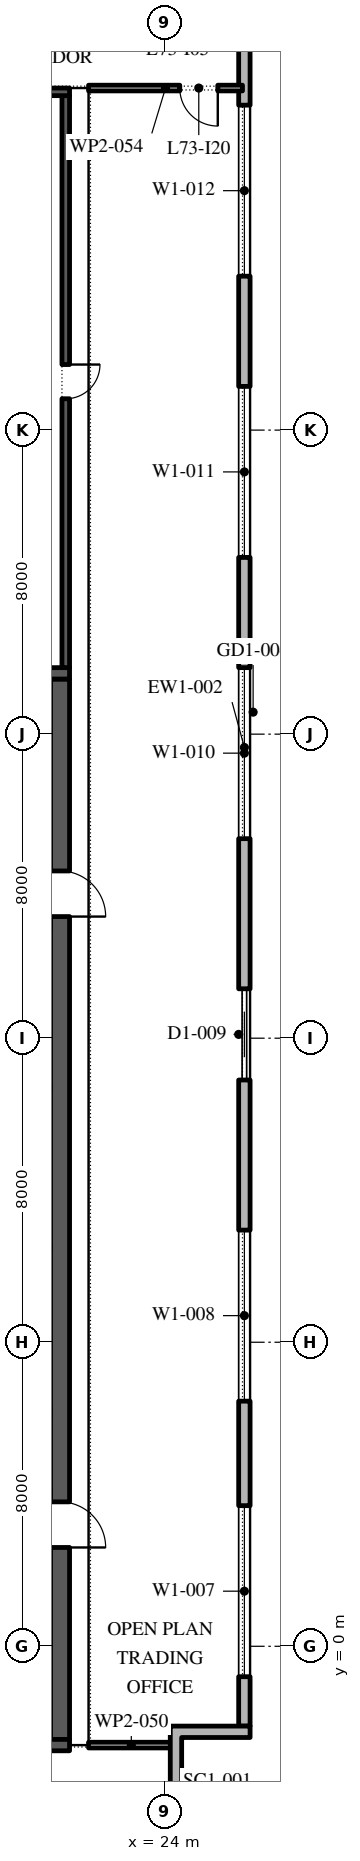
"""IFC4 building model, lengths in metres.
Left out: names, types, materials, properties, quantities, classifications, styles, units other than length and angle.
Written with IfcOpenShell. Run it as: python <this file> out.ifc"""

import sys

from ifc_helpers import new_model, si_unit, direction, frame, frame_2d, origin, place, context, subcontext, project, spatial, polyline, rectangle, outline, extrude, element, fill, save


model = new_model("IFC4")
c1 = context("Model", 3, precision=1e-05, world=origin(), true_north=direction((0.0, 1.0)))
c2 = subcontext(c1, "Body", "Model", "MODEL_VIEW")
j1 = project(units=[si_unit("LENGTHUNIT", "METRE"), si_unit("PLANEANGLEUNIT", "RADIAN")], contexts=[c1])
p1 = place(None, origin())
s1 = spatial("IfcSite", under=j1, at=p1, CompositionType="ELEMENT")
p2 = place(p1, origin())
s2 = spatial("IfcBuilding", under=s1, at=p2, CompositionType="ELEMENT")
p3 = place(p2, frame((0.0, 0.0, 334.2)))
s3 = spatial("IfcBuildingStorey", under=s2, at=p3, CompositionType="ELEMENT", Elevation=334.2)
p4 = place(p3, frame((26.1, -2.1, 0.0), z_axis=(0.0, 0.0, 1.0), x_axis=(0.0, 1.0, 0.0)))
e1 = element("IfcWall", 1, at=p4, inside=s3, PredefinedType="STANDARD", context=c2, shape_type="SweptSolid", body=[
    extrude(rectangle(XDim=51.5, YDim=0.3, at=frame_2d((25.75, 0.0))), origin(), (0.0, 0.0, 1.0), 4.0),
])
p5 = place(p4, frame((1.3, 0.0, 0.45)))
e2 = element("IfcOpeningElement", 2, at=p5, cuts=e1, PredefinedType="OPENING", context=c2, shape_type="SweptSolid", body=[
    extrude(rectangle(XDim=4.5, YDim=3.05, at=frame_2d((2.25, 1.525))), frame((0.0, 0.16, 0.0), z_axis=(0.0, -1.0, 0.0), x_axis=(1.0, 0.0, 0.0)), (0.0, 0.0, 1.0), 0.32),
])
p6 = place(p4, frame((8.55, 0.0, 0.45)))
e3 = element("IfcOpeningElement", 3, at=p6, cuts=e1, PredefinedType="OPENING", context=c2, shape_type="SweptSolid", body=[
    extrude(rectangle(XDim=4.5, YDim=3.05, at=frame_2d((2.25, 1.525))), frame((0.0, 0.16, 0.0), z_axis=(0.0, -1.0, 0.0), x_axis=(1.0, 0.0, 0.0)), (0.0, 0.0, 1.0), 0.32),
])
p7 = place(p4, frame((17.0, 0.0, 0.0)))
e4 = element("IfcOpeningElement", 4, at=p7, cuts=e1, PredefinedType="OPENING", context=c2, shape_type="SweptSolid", body=[
    extrude(rectangle(XDim=2.4, YDim=3.5, at=frame_2d((1.2, 1.75))), frame((0.0, 0.16, 0.0), z_axis=(0.0, -1.0, 0.0), x_axis=(1.0, 0.0, 0.0)), (0.0, 0.0, 1.0), 0.32),
])
p8 = place(p4, frame((23.35, 0.0, 0.45)))
e5 = element("IfcOpeningElement", 5, at=p8, cuts=e1, PredefinedType="OPENING", context=c2, shape_type="SweptSolid", body=[
    extrude(rectangle(XDim=4.5, YDim=3.05, at=frame_2d((2.25, 1.525))), frame((0.0, 0.16, 0.0), z_axis=(0.0, -1.0, 0.0), x_axis=(1.0, 0.0, 0.0)), (0.0, 0.0, 1.0), 0.32),
])
p9 = place(p4, frame((30.75, 0.0, 0.45)))
e6 = element("IfcOpeningElement", 6, at=p9, cuts=e1, PredefinedType="OPENING", context=c2, shape_type="SweptSolid", body=[
    extrude(rectangle(XDim=4.5, YDim=3.05, at=frame_2d((2.25, 1.525))), frame((0.0, 0.16, 0.0), z_axis=(0.0, -1.0, 0.0), x_axis=(1.0, 0.0, 0.0)), (0.0, 0.0, 1.0), 0.32),
])
p10 = place(p4, frame((38.15, 0.0, 0.45)))
e7 = element("IfcOpeningElement", 7, at=p10, cuts=e1, PredefinedType="OPENING", context=c2, shape_type="SweptSolid", body=[
    extrude(rectangle(XDim=4.5, YDim=3.05, at=frame_2d((2.25, 1.525))), frame((0.0, 0.16, 0.0), z_axis=(0.0, -1.0, 0.0), x_axis=(1.0, 0.0, 0.0)), (0.0, 0.0, 1.0), 0.32),
])
p11 = place(p4, frame((46.6, 0.0, 0.0)))
e8 = element("IfcOpeningElement", 8, at=p11, cuts=e1, PredefinedType="OPENING", context=c2, shape_type="SweptSolid", body=[
    extrude(rectangle(XDim=2.4, YDim=3.5, at=frame_2d((1.2, 1.75))), frame((0.0, 0.16, 0.0), z_axis=(0.0, -1.0, 0.0), x_axis=(1.0, 0.0, 0.0)), (0.0, 0.0, 1.0), 0.32),
])
p12 = place(p3, origin())
e9 = element("IfcWall", 9, at=p12, inside=s3, PredefinedType="STANDARD", context=c2, shape_type="SweptSolid", body=[
    extrude(outline(polyline([(24.15, -3.9), (24.15, -2.1), (26.25, -2.1), (26.25, -2.4), (24.45, -2.4), (24.45, -4.2), (22.65, -4.2), (22.65, -5.7), (22.35, -5.7), (22.35, -3.9), (24.15, -3.9)])), origin(), (0.0, 0.0, 1.0), 4.0),
])
p13 = place(p3, frame((21.25, -2.45, 0.0), z_axis=(0.0, 0.0, 1.0), x_axis=(0.0, 1.0, 0.0)))
e10 = element("IfcWall", 10, at=p13, inside=s3, PredefinedType="SHEAR", context=c2, shape_type="SweptSolid", body=[
    extrude(rectangle(XDim=27.9, YDim=0.5, at=frame_2d((13.95, 0.0))), origin(), (0.0, 0.0, 1.0), 4.0),
])
p14 = place(p13, frame((5.05, 0.0, 0.0)))
e11 = element("IfcOpeningElement", 11, at=p14, cuts=e10, PredefinedType="OPENING", context=c2, shape_type="SweptSolid", body=[
    extrude(rectangle(XDim=1.2, YDim=2.1, at=frame_2d((0.6, 1.05))), frame((0.0, 0.26, 0.0), z_axis=(0.0, -1.0, 0.0), x_axis=(1.0, 0.0, 0.0)), (0.0, 0.0, 1.0), 0.52),
])
p15 = place(p13, frame((21.65, 0.0, 0.0)))
e12 = element("IfcOpeningElement", 12, at=p15, cuts=e10, PredefinedType="OPENING", context=c2, shape_type="SweptSolid", body=[
    extrude(rectangle(XDim=1.2, YDim=2.1, at=frame_2d((0.6, 1.05))), frame((0.0, 0.26, 0.0), z_axis=(0.0, -1.0, 0.0), x_axis=(1.0, 0.0, 0.0)), (0.0, 0.0, 1.0), 0.52),
])
for number, where, z_axis, x_axis in (
    (13, (10.5, -2.6, 0.0), (0.0, 0.0, 1.0), (1.0, 0.0, 0.0)),
    (14, (10.5, 25.6, 0.0), (0.0, 0.0, 1.0), (1.0, 0.0, 0.0)),
):
    element("IfcWall", number, at=place(p3, frame(where, z_axis=z_axis, x_axis=x_axis)), inside=s3, PredefinedType="SHEAR", context=c2, shape_type="SweptSolid", body=[
        extrude(rectangle(XDim=11.0, YDim=0.3, at=frame_2d((5.5, 0.0))), origin(), (0.0, 0.0, 1.0), 4.0),
    ])
p16 = place(p3, frame((21.4, 25.75, 0.0), z_axis=(0.0, 0.0, 1.0), x_axis=(0.0, 1.0, 0.0)))
e15 = element("IfcWall", 15, at=p16, inside=s3, PredefinedType="SHEAR", context=c2, shape_type="SweptSolid", body=[
    extrude(rectangle(XDim=15.05, YDim=0.2, at=frame_2d((7.525, 0.0))), origin(), (0.0, 0.0, 1.0), 4.0),
])
p17 = place(p16, frame((7.075, 0.0, 0.0)))
e16 = element("IfcOpeningElement", 16, at=p17, cuts=e15, PredefinedType="OPENING", context=c2, shape_type="SweptSolid", body=[
    extrude(rectangle(XDim=0.9, YDim=2.1, at=frame_2d((0.45, 1.05))), frame((0.0, 0.11, 0.0), z_axis=(0.0, -1.0, 0.0), x_axis=(1.0, 0.0, 0.0)), (0.0, 0.0, 1.0), 0.22),
])
p18 = place(p3, frame((10.5, 40.9, 0.0), z_axis=(0.0, 0.0, 1.0), x_axis=(1.0, 0.0, 0.0)))
e17 = element("IfcWall", 17, at=p18, inside=s3, PredefinedType="SHEAR", context=c2, shape_type="SweptSolid", body=[
    extrude(rectangle(XDim=11.0, YDim=0.2, at=frame_2d((5.5, 0.0))), origin(), (0.0, 0.0, 1.0), 4.0),
])
p19 = place(p3, frame((22.0, -2.6, 0.0), z_axis=(0.0, 0.0, 1.0), x_axis=(1.0, 0.0, 0.0)))
e18 = element("IfcWall", 18, at=p19, inside=s3, PredefinedType="PARTITIONING", context=c2, shape_type="SweptSolid", body=[
    extrude(rectangle(XDim=2.25, YDim=0.15, at=frame_2d((1.125, 0.0))), origin(), (0.0, 0.0, 1.0), 4.0),
])
p20 = place(p3, frame((26.05, 41.0, 0.0), z_axis=(0.0, 0.0, 1.0), x_axis=(-1.0, 0.0, 0.0)))
e19 = element("IfcWall", 19, at=p20, inside=s3, PredefinedType="PARTITIONING", context=c2, shape_type="SweptSolid", body=[
    extrude(rectangle(XDim=4.05, YDim=0.15, at=frame_2d((2.025, 0.0))), origin(), (0.0, 0.0, 1.0), 4.0),
])
p21 = place(p20, frame((0.65, 0.0, 0.0)))
e20 = element("IfcOpeningElement", 20, at=p21, cuts=e19, PredefinedType="OPENING", context=c2, shape_type="SweptSolid", body=[
    extrude(rectangle(XDim=1.0, YDim=2.1, at=frame_2d((0.5, 1.05))), frame((0.0, 0.085, 0.0), z_axis=(0.0, -1.0, 0.0), x_axis=(1.0, 0.0, 0.0)), (0.0, 0.0, 1.0), 0.17),
])
p22 = place(p5, origin())
e21 = element("IfcWindow", 21, at=p22, inside=s3, PartitioningType="DOUBLE_PANEL_VERTICAL", PredefinedType="WINDOW", context=c2, shape_type="SweptSolid", body=[
    extrude(rectangle(XDim=4.5, YDim=3.05, at=frame_2d((2.25, 1.525))), frame((0.0, 0.03, 0.0), z_axis=(0.0, -1.0, 0.0), x_axis=(1.0, 0.0, 0.0)), (0.0, 0.0, 1.0), 0.06),
])
fill(e2, e21)
p23 = place(p6, origin())
e22 = element("IfcWindow", 22, at=p23, inside=s3, PartitioningType="DOUBLE_PANEL_VERTICAL", PredefinedType="WINDOW", context=c2, shape_type="SweptSolid", body=[
    extrude(rectangle(XDim=4.5, YDim=3.05, at=frame_2d((2.25, 1.525))), frame((0.0, 0.03, 0.0), z_axis=(0.0, -1.0, 0.0), x_axis=(1.0, 0.0, 0.0)), (0.0, 0.0, 1.0), 0.06),
])
fill(e3, e22)
p24 = place(p7, origin())
e23 = element("IfcDoor", 23, at=p24, inside=s3, OperationType="DOUBLE_DOOR_SLIDING", PredefinedType="DOOR", context=c2, shape_type="SweptSolid", body=[
    extrude(rectangle(XDim=2.4, YDim=3.5, at=frame_2d((1.2, 1.75))), frame((0.0, 0.025, 0.0), z_axis=(0.0, -1.0, 0.0), x_axis=(1.0, 0.0, 0.0)), (0.0, 0.0, 1.0), 0.05),
])
fill(e4, e23)
p25 = place(p8, origin())
e24 = element("IfcWindow", 24, at=p25, inside=s3, PartitioningType="DOUBLE_PANEL_VERTICAL", PredefinedType="WINDOW", context=c2, shape_type="SweptSolid", body=[
    extrude(rectangle(XDim=4.5, YDim=3.05, at=frame_2d((2.25, 1.525))), frame((0.0, 0.03, 0.0), z_axis=(0.0, -1.0, 0.0), x_axis=(1.0, 0.0, 0.0)), (0.0, 0.0, 1.0), 0.06),
])
fill(e5, e24)
p26 = place(p9, origin())
e25 = element("IfcWindow", 25, at=p26, inside=s3, PartitioningType="DOUBLE_PANEL_VERTICAL", PredefinedType="WINDOW", context=c2, shape_type="SweptSolid", body=[
    extrude(rectangle(XDim=4.5, YDim=3.05, at=frame_2d((2.25, 1.525))), frame((0.0, 0.03, 0.0), z_axis=(0.0, -1.0, 0.0), x_axis=(1.0, 0.0, 0.0)), (0.0, 0.0, 1.0), 0.06),
])
fill(e6, e25)
p27 = place(p10, origin())
e26 = element("IfcWindow", 26, at=p27, inside=s3, PartitioningType="DOUBLE_PANEL_VERTICAL", PredefinedType="WINDOW", context=c2, shape_type="SweptSolid", body=[
    extrude(rectangle(XDim=4.5, YDim=3.05, at=frame_2d((2.25, 1.525))), frame((0.0, 0.03, 0.0), z_axis=(0.0, -1.0, 0.0), x_axis=(1.0, 0.0, 0.0)), (0.0, 0.0, 1.0), 0.06),
])
fill(e7, e26)
p28 = place(p14, frame((1.2, 0.0, 0.0), z_axis=(0.0, 0.0, 1.0), x_axis=(-1.0, 0.0, 0.0)))
e27 = element("IfcDoor", 27, at=p28, inside=s3, OperationType="SINGLE_SWING_LEFT", PredefinedType="DOOR", context=c2, shape_type="SweptSolid", body=[
    extrude(rectangle(XDim=1.2, YDim=2.1, at=frame_2d((0.6, 1.05))), frame((0.0, 0.025, 0.0), z_axis=(0.0, -1.0, 0.0), x_axis=(1.0, 0.0, 0.0)), (0.0, 0.0, 1.0), 0.05),
])
fill(e11, e27)
p29 = place(p15, frame((1.2, 0.0, 0.0), z_axis=(0.0, 0.0, 1.0), x_axis=(-1.0, 0.0, 0.0)))
e28 = element("IfcDoor", 28, at=p29, inside=s3, OperationType="SINGLE_SWING_LEFT", PredefinedType="DOOR", context=c2, shape_type="SweptSolid", body=[
    extrude(rectangle(XDim=1.2, YDim=2.1, at=frame_2d((0.6, 1.05))), frame((0.0, 0.025, 0.0), z_axis=(0.0, -1.0, 0.0), x_axis=(1.0, 0.0, 0.0)), (0.0, 0.0, 1.0), 0.05),
])
fill(e12, e28)
p30 = place(p17, frame((0.9, 0.15, 0.0), z_axis=(0.0, 0.0, 1.0), x_axis=(-1.0, 0.0, 0.0)))
e29 = element("IfcDoor", 29, at=p30, inside=s3, OperationType="SINGLE_SWING_RIGHT", PredefinedType="DOOR", context=c2, shape_type="SweptSolid", body=[
    extrude(rectangle(XDim=0.9, YDim=2.1, at=frame_2d((0.45, 1.05))), frame((0.0, 0.1, 0.0), z_axis=(0.0, -1.0, 0.0), x_axis=(1.0, 0.0, 0.0)), (0.0, 0.0, 1.0), 0.05),
])
fill(e16, e29)
p31 = place(p21, origin())
e30 = element("IfcDoor", 30, at=p31, inside=s3, OperationType="SINGLE_SWING_RIGHT", PredefinedType="DOOR", context=c2, shape_type="SweptSolid", body=[
    extrude(rectangle(XDim=1.0, YDim=2.1, at=frame_2d((0.5, 1.05))), frame((0.0, 0.025, 0.0), z_axis=(0.0, -1.0, 0.0), x_axis=(1.0, 0.0, 0.0)), (0.0, 0.0, 1.0), 0.05),
])
fill(e20, e30)
save(model, sys.argv[1])
